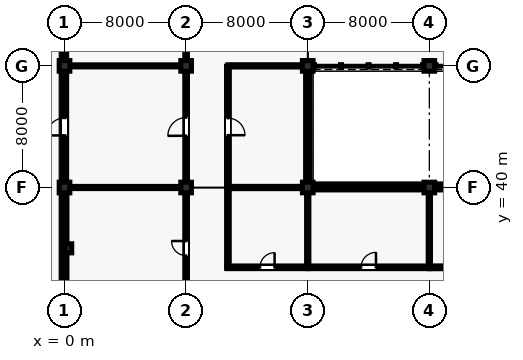
"""IFC4 building model, lengths in metres.
Left out: names, types, materials, properties, quantities, classifications, styles, units other than length and angle.
Written with IfcOpenShell. Run it as: python <this file> out.ifc"""

import sys

from ifc_helpers import new_model, si_unit, direction, frame, frame_2d, origin, origin_2d, place, context, subcontext, project, spatial, rectangle, extrude, element, fill, save


model = new_model("IFC4")
c1 = context("Model", 3, precision=1e-05, world=origin(), true_north=direction((0.0, 1.0)))
c2 = subcontext(c1, "Body", "Model", "MODEL_VIEW")
j1 = project(units=[si_unit("LENGTHUNIT", "METRE"), si_unit("PLANEANGLEUNIT", "RADIAN")], contexts=[c1])
p1 = place(None, origin())
s1 = spatial("IfcSite", under=j1, at=p1, CompositionType="ELEMENT")
p2 = place(p1, origin())
s2 = spatial("IfcBuilding", under=s1, at=p2, CompositionType="ELEMENT")
p3 = place(p2, origin())
s3 = spatial("IfcBuildingStorey", under=s2, at=p3, CompositionType="ELEMENT", Elevation=0.0)
for number, where, z_axis, x_axis in (
    (1, (0.0, 40.0, 0.0), (0.0, 0.0, 1.0), (1.0, 0.0, 0.0)),
    (2, (0.0, 48.0, 0.0), (0.0, 0.0, 1.0), (1.0, 0.0, 0.0)),
    (3, (8.0, 40.0, 0.0), (0.0, 0.0, 1.0), (1.0, 0.0, 0.0)),
    (4, (8.0, 48.0, 0.0), (0.0, 0.0, 1.0), (1.0, 0.0, 0.0)),
    (5, (16.0, 40.0, 0.0), (0.0, 0.0, 1.0), (1.0, 0.0, 0.0)),
    (6, (16.0, 48.0, 0.0), (0.0, 0.0, 1.0), (1.0, 0.0, 0.0)),
    (7, (24.0, 40.0, 0.0), (0.0, 0.0, 1.0), (1.0, 0.0, 0.0)),
    (8, (24.0, 48.0, 0.0), (0.0, 0.0, 1.0), (1.0, 0.0, 0.0)),
):
    element("IfcColumn", number, at=place(p3, frame(where, z_axis=z_axis, x_axis=x_axis)), inside=s3, PredefinedType="COLUMN", context=c2, shape_type="SweptSolid", body=[
        extrude(rectangle(XDim=0.7, YDim=0.7, at=origin_2d()), origin(), (0.0, 0.0, 1.0), 5.28),
    ])
p4 = place(p3, frame((0.25, 36.0, 0.0), z_axis=(0.0, 0.0, 1.0), x_axis=(1.0, 0.0, 0.0)))
e9 = element("IfcColumn", 9, at=p4, inside=s3, PredefinedType="PILASTER", context=c2, shape_type="SweptSolid", body=[
    extrude(rectangle(XDim=0.45, YDim=0.6, at=origin_2d()), origin(), (0.0, 0.0, 1.0), 5.28),
])
p5 = place(p3, frame((0.0, 32.335, 0.0), z_axis=(0.0, 0.0, 1.0), x_axis=(0.0, 1.0, 0.0)))
e10 = element("IfcWall", 10, at=p5, inside=s3, PredefinedType="SOLIDWALL", context=c2, shape_type="SweptSolid", body=[
    extrude(rectangle(XDim=7.33, YDim=0.32, at=frame_2d((3.665, 0.0))), origin(), (0.0, 0.0, 1.0), 4.61),
])
p6 = place(p5, frame((4.25, 0.0, 0.9)))
e11 = element("IfcOpeningElement", 11, at=p6, cuts=e10, PredefinedType="OPENING", context=c2, shape_type="SweptSolid", body=[
    extrude(rectangle(XDim=2.4, YDim=2.8, at=frame_2d((1.2, 1.4))), frame((0.0, 0.17, 0.0), z_axis=(0.0, -1.0, 0.0), x_axis=(1.0, 0.0, 0.0)), (0.0, 0.0, 1.0), 0.34),
])
p7 = place(p3, frame((0.0, 40.335, 0.0), z_axis=(0.0, 0.0, 1.0), x_axis=(0.0, 1.0, 0.0)))
e12 = element("IfcWall", 12, at=p7, inside=s3, PredefinedType="SOLIDWALL", context=c2, shape_type="SweptSolid", body=[
    extrude(rectangle(XDim=7.33, YDim=0.28, at=frame_2d((3.665, 0.0))), origin(), (0.0, 0.0, 1.0), 4.674),
])
p8 = place(p7, frame((3.09, 0.0, 0.0)))
e13 = element("IfcOpeningElement", 13, at=p8, cuts=e12, PredefinedType="OPENING", context=c2, shape_type="SweptSolid", body=[
    extrude(rectangle(XDim=1.15, YDim=2.2, at=frame_2d((0.575, 1.1))), frame((0.0, 0.15, 0.0), z_axis=(0.0, -1.0, 0.0), x_axis=(1.0, 0.0, 0.0)), (0.0, 0.0, 1.0), 0.3),
])
p9 = place(p3, frame((0.0, 48.335, 0.0), z_axis=(0.0, 0.0, 1.0), x_axis=(0.0, 1.0, 0.0)))
e14 = element("IfcWall", 14, at=p9, inside=s3, PredefinedType="SOLIDWALL", context=c2, shape_type="SweptSolid", body=[
    extrude(rectangle(XDim=7.33, YDim=0.28, at=frame_2d((3.665, 0.0))), origin(), (0.0, 0.0, 1.0), 4.614),
])
p10 = place(p9, frame((2.565, 0.0, 0.0)))
e15 = element("IfcOpeningElement", 15, at=p10, cuts=e14, PredefinedType="OPENING", context=c2, shape_type="SweptSolid", body=[
    extrude(rectangle(XDim=2.2, YDim=2.5, at=frame_2d((1.1, 1.25))), frame((0.0, 0.15, 0.0), z_axis=(0.0, -1.0, 0.0), x_axis=(1.0, 0.0, 0.0)), (0.0, 0.0, 1.0), 0.3),
])
p11 = place(p3, frame((16.0, 40.335, 0.0), z_axis=(0.0, 0.0, 1.0), x_axis=(0.0, 1.0, 0.0)))
e16 = element("IfcWall", 16, at=p11, inside=s3, PredefinedType="SOLIDWALL", context=c2, shape_type="SweptSolid", body=[
    extrude(rectangle(XDim=7.33, YDim=0.28, at=frame_2d((3.665, 0.0))), origin(), (0.0, 0.0, 1.0), 4.677),
])
p12 = place(p11, frame((2.74, 0.0, 0.9)))
e17 = element("IfcOpeningElement", 17, at=p12, cuts=e16, PredefinedType="OPENING", context=c2, shape_type="SweptSolid", body=[
    extrude(rectangle(XDim=1.85, YDim=2.65, at=frame_2d((0.925, 1.325))), frame((0.0, 0.15, 0.0), z_axis=(0.0, -1.0, 0.0), x_axis=(1.0, 0.0, 0.0)), (0.0, 0.0, 1.0), 0.3),
])
p13 = place(p3, frame((16.335, 40.0, 0.0), z_axis=(0.0, 0.0, 1.0), x_axis=(1.0, 0.0, 0.0)))
e18 = element("IfcWall", 18, at=p13, inside=s3, PredefinedType="SOLIDWALL", context=c2, shape_type="SweptSolid", body=[
    extrude(rectangle(XDim=7.33, YDim=0.32, at=frame_2d((3.665, 0.0))), origin(), (0.0, 0.0, 1.0), 4.677),
])
p14 = place(p13, frame((2.74, 0.0, 0.9)))
e19 = element("IfcOpeningElement", 19, at=p14, cuts=e18, PredefinedType="OPENING", context=c2, shape_type="SweptSolid", body=[
    extrude(rectangle(XDim=1.85, YDim=2.65, at=frame_2d((0.925, 1.325))), frame((0.0, 0.17, 0.0), z_axis=(0.0, -1.0, 0.0), x_axis=(1.0, 0.0, 0.0)), (0.0, 0.0, 1.0), 0.34),
])
p15 = place(p3, frame((24.335, 40.0, 0.0), z_axis=(0.0, 0.0, 1.0), x_axis=(1.0, 0.0, 0.0)))
e20 = element("IfcWall", 20, at=p15, inside=s3, PredefinedType="SOLIDWALL", context=c2, shape_type="SweptSolid", body=[
    extrude(rectangle(XDim=7.33, YDim=0.32, at=frame_2d((3.665, 0.0))), origin(), (0.0, 0.0, 1.0), 4.61),
])
p16 = place(p15, frame((2.515, 0.0, 0.9)))
e21 = element("IfcOpeningElement", 21, at=p16, cuts=e20, PredefinedType="OPENING", context=c2, shape_type="SweptSolid", body=[
    extrude(rectangle(XDim=2.3, YDim=2.55, at=frame_2d((1.15, 1.275))), frame((0.0, 0.17, 0.0), z_axis=(0.0, -1.0, 0.0), x_axis=(1.0, 0.0, 0.0)), (0.0, 0.0, 1.0), 0.34),
])
p17 = place(p3, frame((10.7, 34.75, 0.0), z_axis=(0.0, 0.0, 1.0), x_axis=(1.0, 0.0, 0.0)))
e22 = element("IfcWall", 22, at=p17, inside=s3, PredefinedType="PARTITIONING", context=c2, shape_type="SweptSolid", body=[
    extrude(rectangle(XDim=5.28, YDim=0.175, at=frame_2d((2.64, 0.0))), origin(), (0.0, 0.0, 1.0), 4.404),
])
p18 = place(p17, frame((2.16, 0.0, 0.0)))
e23 = element("IfcOpeningElement", 23, at=p18, cuts=e22, PredefinedType="OPENING", context=c2, shape_type="SweptSolid", body=[
    extrude(rectangle(XDim=0.96, YDim=2.14, at=frame_2d((0.48, 1.07))), frame((0.0, 0.097, 0.0), z_axis=(0.0, -1.0, 0.0), x_axis=(1.0, 0.0, 0.0)), (0.0, 0.0, 1.0), 0.195),
])
p19 = place(p3, frame((10.75, 34.7, 0.0), z_axis=(0.0, 0.0, 1.0), x_axis=(0.0, 1.0, 0.0)))
e24 = element("IfcWall", 24, at=p19, inside=s3, PredefinedType="PARTITIONING", context=c2, shape_type="SweptSolid", body=[
    extrude(rectangle(XDim=5.28, YDim=0.175, at=frame_2d((2.64, 0.0))), origin(), (0.0, 0.0, 1.0), 4.336),
])
p20 = place(p3, frame((10.75, 40.0, 0.0), z_axis=(0.0, 0.0, 1.0), x_axis=(1.0, 0.0, 0.0)))
e25 = element("IfcWall", 25, at=p20, inside=s3, PredefinedType="PARTITIONING", context=c2, shape_type="SweptSolid", body=[
    extrude(rectangle(XDim=4.89, YDim=0.15, at=frame_2d((2.445, 0.0))), origin(), (0.0, 0.0, 1.0), 4.336),
])
p21 = place(p3, frame((16.0, 34.75, 0.0), z_axis=(0.0, 0.0, 1.0), x_axis=(0.0, 1.0, 0.0)))
e26 = element("IfcWall", 26, at=p21, inside=s3, PredefinedType="PARTITIONING", context=c2, shape_type="SweptSolid", body=[
    extrude(rectangle(XDim=4.89, YDim=0.15, at=frame_2d((2.445, 0.0))), origin(), (0.0, 0.0, 1.0), 4.404),
])
p22 = place(p3, frame((10.75, 40.02, 0.0), z_axis=(0.0, 0.0, 1.0), x_axis=(0.0, 1.0, 0.0)))
e27 = element("IfcWall", 27, at=p22, inside=s3, PredefinedType="PARTITIONING", context=c2, shape_type="SweptSolid", body=[
    extrude(rectangle(XDim=7.96, YDim=0.185, at=frame_2d((3.98, 0.0))), origin(), (0.0, 0.0, 1.0), 4.336),
])
p23 = place(p22, frame((3.42, 0.0, 0.0)))
e28 = element("IfcOpeningElement", 28, at=p23, cuts=e27, PredefinedType="OPENING", context=c2, shape_type="SweptSolid", body=[
    extrude(rectangle(XDim=1.12, YDim=2.22, at=frame_2d((0.56, 1.11))), frame((0.0, 0.103, 0.0), z_axis=(0.0, -1.0, 0.0), x_axis=(1.0, 0.0, 0.0)), (0.0, 0.0, 1.0), 0.205),
])
p24 = place(p3, frame((10.75, 48.0, 0.0), z_axis=(0.0, 0.0, 1.0), x_axis=(1.0, 0.0, 0.0)))
e29 = element("IfcWall", 29, at=p24, inside=s3, PredefinedType="PARTITIONING", context=c2, shape_type="SweptSolid", body=[
    extrude(rectangle(XDim=4.89, YDim=0.15, at=frame_2d((2.445, 0.0))), origin(), (0.0, 0.0, 1.0), 4.404),
])
p25 = place(p3, frame((16.02, 34.75, 0.0), z_axis=(0.0, 0.0, 1.0), x_axis=(1.0, 0.0, 0.0)))
e30 = element("IfcWall", 30, at=p25, inside=s3, PredefinedType="PARTITIONING", context=c2, shape_type="SweptSolid", body=[
    extrude(rectangle(XDim=7.96, YDim=0.175, at=frame_2d((3.98, 0.0))), origin(), (0.0, 0.0, 1.0), 4.404),
])
p26 = place(p25, frame((3.49, 0.0, 0.0)))
e31 = element("IfcOpeningElement", 31, at=p26, cuts=e30, PredefinedType="OPENING", context=c2, shape_type="SweptSolid", body=[
    extrude(rectangle(XDim=0.98, YDim=2.15, at=frame_2d((0.49, 1.075))), frame((0.0, 0.097, 0.0), z_axis=(0.0, -1.0, 0.0), x_axis=(1.0, 0.0, 0.0)), (0.0, 0.0, 1.0), 0.195),
])
p27 = place(p3, frame((24.0, 34.75, 0.0), z_axis=(0.0, 0.0, 1.0), x_axis=(0.0, 1.0, 0.0)))
e32 = element("IfcWall", 32, at=p27, inside=s3, PredefinedType="PARTITIONING", context=c2, shape_type="SweptSolid", body=[
    extrude(rectangle(XDim=4.89, YDim=0.15, at=frame_2d((2.445, 0.0))), origin(), (0.0, 0.0, 1.0), 4.471),
])
p28 = place(p3, frame((24.02, 34.75, 0.0), z_axis=(0.0, 0.0, 1.0), x_axis=(1.0, 0.0, 0.0)))
e33 = element("IfcWall", 33, at=p28, inside=s3, PredefinedType="PARTITIONING", context=c2, shape_type="SweptSolid", body=[
    extrude(rectangle(XDim=7.96, YDim=0.185, at=frame_2d((3.98, 0.0))), origin(), (0.0, 0.0, 1.0), 4.403),
])
p29 = place(p28, frame((3.46, 0.0, 0.0)))
e34 = element("IfcOpeningElement", 34, at=p29, cuts=e33, PredefinedType="OPENING", context=c2, shape_type="SweptSolid", body=[
    extrude(rectangle(XDim=1.04, YDim=2.18, at=frame_2d((0.52, 1.09))), frame((0.0, 0.103, 0.0), z_axis=(0.0, -1.0, 0.0), x_axis=(1.0, 0.0, 0.0)), (0.0, 0.0, 1.0), 0.205),
])
p30 = place(p3, frame((8.0, 32.34, 0.0), z_axis=(0.0, 0.0, 1.0), x_axis=(0.0, 1.0, 0.0)))
e35 = element("IfcWall", 35, at=p30, inside=s3, PredefinedType="PARTITIONING", context=c2, shape_type="SweptSolid", body=[
    extrude(rectangle(XDim=7.32, YDim=0.175, at=frame_2d((3.66, 0.0))), origin(), (0.0, 0.0, 1.0), 4.412),
])
p31 = place(p30, frame((3.18, 0.0, 0.0)))
e36 = element("IfcOpeningElement", 36, at=p31, cuts=e35, PredefinedType="OPENING", context=c2, shape_type="SweptSolid", body=[
    extrude(rectangle(XDim=0.96, YDim=2.14, at=frame_2d((0.48, 1.07))), frame((0.0, 0.097, 0.0), z_axis=(0.0, -1.0, 0.0), x_axis=(1.0, 0.0, 0.0)), (0.0, 0.0, 1.0), 0.195),
])
p32 = place(p3, frame((0.34, 40.0, 0.0), z_axis=(0.0, 0.0, 1.0), x_axis=(1.0, 0.0, 0.0)))
e37 = element("IfcWall", 37, at=p32, inside=s3, PredefinedType="PARTITIONING", context=c2, shape_type="SweptSolid", body=[
    extrude(rectangle(XDim=7.32, YDim=0.142, at=frame_2d((3.66, 0.0))), origin(), (0.0, 0.0, 1.0), 4.403),
])
p33 = place(p3, frame((8.0, 40.34, 0.0), z_axis=(0.0, 0.0, 1.0), x_axis=(0.0, 1.0, 0.0)))
e38 = element("IfcWall", 38, at=p33, inside=s3, PredefinedType="PARTITIONING", context=c2, shape_type="SweptSolid", body=[
    extrude(rectangle(XDim=7.32, YDim=0.175, at=frame_2d((3.66, 0.0))), origin(), (0.0, 0.0, 1.0), 4.404),
])
p34 = place(p33, frame((3.06, 0.0, 0.0)))
e39 = element("IfcOpeningElement", 39, at=p34, cuts=e38, PredefinedType="OPENING", context=c2, shape_type="SweptSolid", body=[
    extrude(rectangle(XDim=1.2, YDim=2.15, at=frame_2d((0.6, 1.075))), frame((0.0, 0.097, 0.0), z_axis=(0.0, -1.0, 0.0), x_axis=(1.0, 0.0, 0.0)), (0.0, 0.0, 1.0), 0.195),
])
p35 = place(p3, frame((0.34, 48.0, 0.0), z_axis=(0.0, 0.0, 1.0), x_axis=(1.0, 0.0, 0.0)))
e40 = element("IfcWall", 40, at=p35, inside=s3, PredefinedType="PARTITIONING", context=c2, shape_type="SweptSolid", body=[
    extrude(rectangle(XDim=7.32, YDim=0.135, at=frame_2d((3.66, 0.0))), origin(), (0.0, 0.0, 1.0), 4.336),
])
p36 = place(p3, frame((8.0, 48.34, 0.0), z_axis=(0.0, 0.0, 1.0), x_axis=(0.0, 1.0, 0.0)))
e41 = element("IfcWall", 41, at=p36, inside=s3, PredefinedType="PARTITIONING", context=c2, shape_type="SweptSolid", body=[
    extrude(rectangle(XDim=7.32, YDim=0.175, at=frame_2d((3.66, 0.0))), origin(), (0.0, 0.0, 1.0), 4.471),
])
p37 = place(p36, frame((3.135, 0.0, 0.0)))
e42 = element("IfcOpeningElement", 42, at=p37, cuts=e41, PredefinedType="OPENING", context=c2, shape_type="SweptSolid", body=[
    extrude(rectangle(XDim=1.05, YDim=2.15, at=frame_2d((0.525, 1.075))), frame((0.0, 0.097, 0.0), z_axis=(0.0, -1.0, 0.0), x_axis=(1.0, 0.0, 0.0)), (0.0, 0.0, 1.0), 0.195),
])
p38 = place(p6, origin())
e43 = element("IfcWindow", 43, at=p38, inside=s3, PartitioningType="SINGLE_PANEL", PredefinedType="WINDOW", context=c2, shape_type="SweptSolid", body=[
    extrude(rectangle(XDim=2.4, YDim=2.8, at=frame_2d((1.2, 1.4))), frame((0.0, 0.03, 0.0), z_axis=(0.0, -1.0, 0.0), x_axis=(1.0, 0.0, 0.0)), (0.0, 0.0, 1.0), 0.06),
])
fill(e11, e43)
p39 = place(p8, origin())
e44 = element("IfcDoor", 44, at=p39, inside=s3, OperationType="SINGLE_SWING_LEFT", PredefinedType="DOOR", context=c2, shape_type="SweptSolid", body=[
    extrude(rectangle(XDim=1.15, YDim=2.2, at=frame_2d((0.575, 1.1))), frame((0.0, 0.025, 0.0), z_axis=(0.0, -1.0, 0.0), x_axis=(1.0, 0.0, 0.0)), (0.0, 0.0, 1.0), 0.05),
])
fill(e13, e44)
p40 = place(p12, origin())
e45 = element("IfcWindow", 45, at=p40, inside=s3, PartitioningType="SINGLE_PANEL", PredefinedType="WINDOW", context=c2, shape_type="SweptSolid", body=[
    extrude(rectangle(XDim=1.85, YDim=2.65, at=frame_2d((0.925, 1.325))), frame((0.0, 0.03, 0.0), z_axis=(0.0, -1.0, 0.0), x_axis=(1.0, 0.0, 0.0)), (0.0, 0.0, 1.0), 0.06),
])
fill(e17, e45)
p41 = place(p14, origin())
e46 = element("IfcWindow", 46, at=p41, inside=s3, PartitioningType="SINGLE_PANEL", PredefinedType="WINDOW", context=c2, shape_type="SweptSolid", body=[
    extrude(rectangle(XDim=1.85, YDim=2.65, at=frame_2d((0.925, 1.325))), frame((0.0, 0.03, 0.0), z_axis=(0.0, -1.0, 0.0), x_axis=(1.0, 0.0, 0.0)), (0.0, 0.0, 1.0), 0.06),
])
fill(e19, e46)
p42 = place(p18, origin())
e47 = element("IfcDoor", 47, at=p42, inside=s3, OperationType="SINGLE_SWING_RIGHT", PredefinedType="DOOR", context=c2, shape_type="SweptSolid", body=[
    extrude(rectangle(XDim=0.96, YDim=2.14, at=frame_2d((0.48, 1.07))), frame((0.0, 0.025, 0.0), z_axis=(0.0, -1.0, 0.0), x_axis=(1.0, 0.0, 0.0)), (0.0, 0.0, 1.0), 0.05),
])
fill(e23, e47)
p43 = place(p23, frame((1.12, 0.0, 0.0), z_axis=(0.0, 0.0, 1.0), x_axis=(-1.0, 0.0, 0.0)))
e48 = element("IfcDoor", 48, at=p43, inside=s3, OperationType="SINGLE_SWING_LEFT", PredefinedType="DOOR", context=c2, shape_type="SweptSolid", body=[
    extrude(rectangle(XDim=1.12, YDim=2.22, at=frame_2d((0.56, 1.11))), frame((0.0, 0.025, 0.0), z_axis=(0.0, -1.0, 0.0), x_axis=(1.0, 0.0, 0.0)), (0.0, 0.0, 1.0), 0.05),
])
fill(e28, e48)
p44 = place(p26, origin())
e49 = element("IfcDoor", 49, at=p44, inside=s3, OperationType="SINGLE_SWING_RIGHT", PredefinedType="DOOR", context=c2, shape_type="SweptSolid", body=[
    extrude(rectangle(XDim=0.98, YDim=2.15, at=frame_2d((0.49, 1.075))), frame((0.0, 0.025, 0.0), z_axis=(0.0, -1.0, 0.0), x_axis=(1.0, 0.0, 0.0)), (0.0, 0.0, 1.0), 0.05),
])
fill(e31, e49)
p45 = place(p31, origin())
e50 = element("IfcDoor", 50, at=p45, inside=s3, OperationType="SINGLE_SWING_RIGHT", PredefinedType="DOOR", context=c2, shape_type="SweptSolid", body=[
    extrude(rectangle(XDim=0.96, YDim=2.14, at=frame_2d((0.48, 1.07))), frame((0.0, 0.025, 0.0), z_axis=(0.0, -1.0, 0.0), x_axis=(1.0, 0.0, 0.0)), (0.0, 0.0, 1.0), 0.05),
])
fill(e36, e50)
p46 = place(p34, origin())
e51 = element("IfcDoor", 51, at=p46, inside=s3, OperationType="SINGLE_SWING_LEFT", PredefinedType="DOOR", context=c2, shape_type="SweptSolid", body=[
    extrude(rectangle(XDim=1.2, YDim=2.15, at=frame_2d((0.6, 1.075))), frame((0.0, 0.025, 0.0), z_axis=(0.0, -1.0, 0.0), x_axis=(1.0, 0.0, 0.0)), (0.0, 0.0, 1.0), 0.05),
])
fill(e39, e51)
save(model, sys.argv[1])
